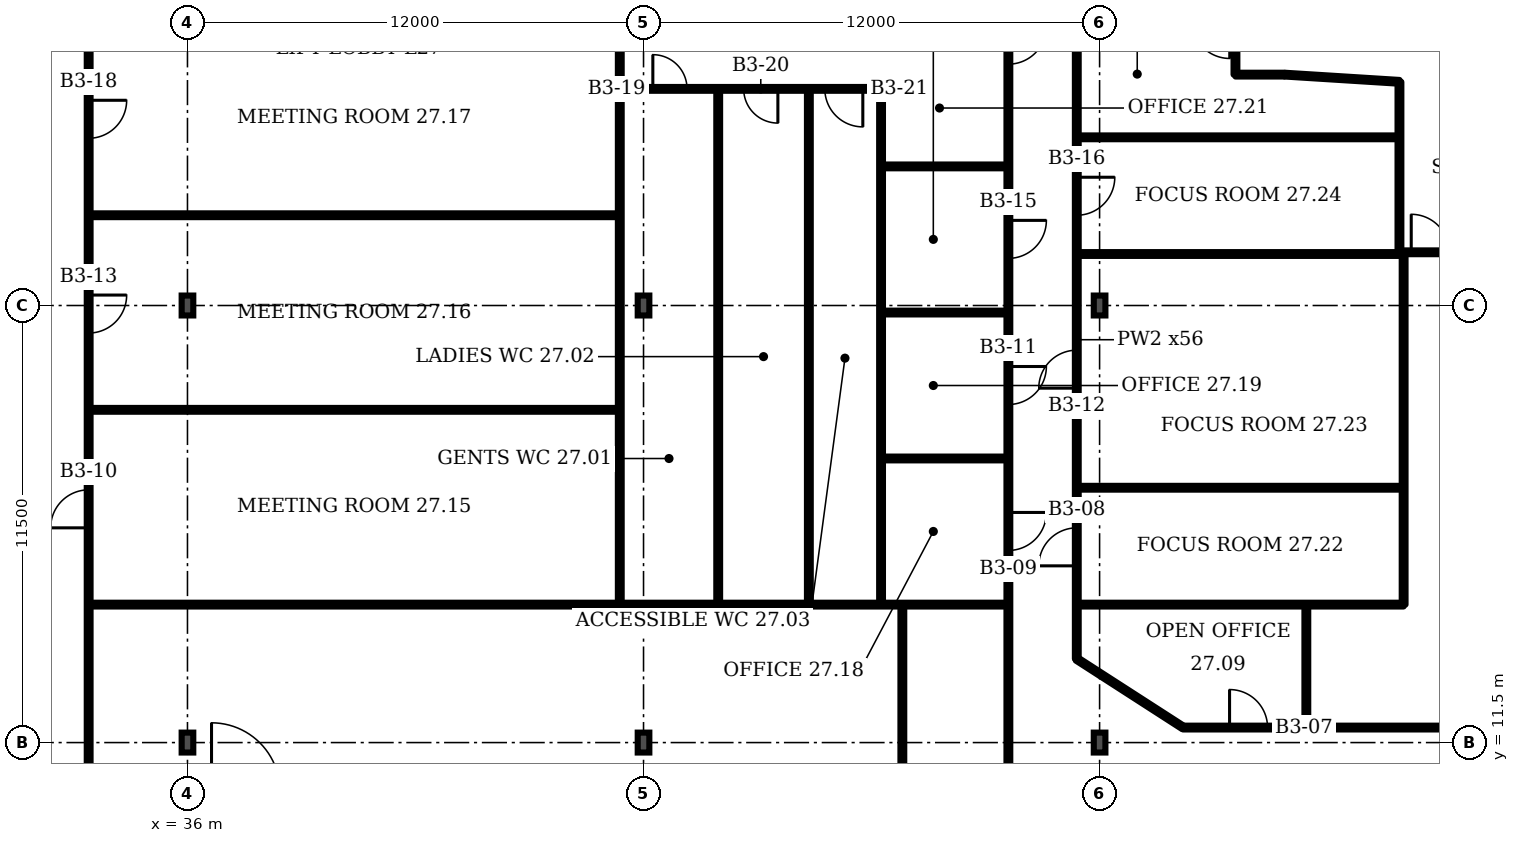
"""IFC4 building model, lengths in metres.
Left out: names, types, materials, properties, quantities, classifications, styles, units other than length and angle.
Written with IfcOpenShell. Run it as: python <this file> out.ifc"""

import sys

from ifc_helpers import new_model, si_unit, direction, frame, frame_2d, origin, origin_2d, place, context, subcontext, project, spatial, rectangle, i_section, extrude, element, fill, save


model = new_model("IFC4")
c1 = context("Model", 3, precision=1e-05, world=origin(), true_north=direction((0.0, 1.0)))
c2 = subcontext(c1, "Body", "Model", "MODEL_VIEW")
j1 = project(units=[si_unit("LENGTHUNIT", "METRE"), si_unit("PLANEANGLEUNIT", "RADIAN")], contexts=[c1])
p1 = place(None, origin())
s1 = spatial("IfcSite", under=j1, at=p1, CompositionType="ELEMENT")
p2 = place(p1, origin())
s2 = spatial("IfcBuilding", under=s1, at=p2, CompositionType="ELEMENT")
p3 = place(p2, frame((0.0, 0.0, 118.3)))
s3 = spatial("IfcBuildingStorey", under=s2, at=p3, CompositionType="ELEMENT", Elevation=118.3)
for number, where, z_axis, x_axis in (
    (1, (36.0, 11.5, 0.0), (0.0, 0.0, 1.0), (1.0, 0.0, 0.0)),
    (2, (48.0, 11.5, 0.0), (0.0, 0.0, 1.0), (1.0, 0.0, 0.0)),
    (3, (60.0, 11.5, 0.0), (0.0, 0.0, 1.0), (1.0, 0.0, 0.0)),
    (4, (36.0, 23.0, 0.0), (0.0, 0.0, 1.0), (1.0, 0.0, 0.0)),
    (5, (48.0, 23.0, 0.0), (0.0, 0.0, 1.0), (1.0, 0.0, 0.0)),
    (6, (60.0, 23.0, 0.0), (0.0, 0.0, 1.0), (1.0, 0.0, 0.0)),
):
    element("IfcColumn", number, at=place(p3, frame(where, z_axis=z_axis, x_axis=x_axis)), inside=s3, PredefinedType="COLUMN", context=c2, shape_type="SweptSolid", body=[
        extrude(i_section(OverallWidth=0.306, OverallDepth=0.524, WebThickness=0.021, FlangeThickness=0.04, FilletRadius=0.027, at=origin_2d()), origin(), (0.0, 0.0, 1.0), 3.6),
    ])
p4 = place(p3, frame((33.4, 10.22, 0.0), z_axis=(0.0, 0.0, 1.0), x_axis=(0.0, 1.0, 0.0)))
e7 = element("IfcWall", 7, at=p4, inside=s3, PredefinedType="PARTITIONING", context=c2, shape_type="SweptSolid", body=[
    extrude(rectangle(XDim=20.28, YDim=0.1, at=frame_2d((10.14, 0.0))), origin(), (0.0, 0.0, 1.0), 3.2),
])
p5 = place(p4, frame((6.93, 0.0, 0.0)))
e8 = element("IfcOpeningElement", 8, at=p5, cuts=e7, PredefinedType="OPENING", context=c2, shape_type="SweptSolid", body=[
    extrude(rectangle(XDim=1.0, YDim=2.1, at=frame_2d((0.5, 1.05))), frame((0.0, 0.06, 0.0), z_axis=(0.0, -1.0, 0.0), x_axis=(1.0, 0.0, 0.0)), (0.0, 0.0, 1.0), 0.12),
])
p6 = place(p4, frame((12.055, 0.0, 0.0)))
e9 = element("IfcOpeningElement", 9, at=p6, cuts=e7, PredefinedType="OPENING", context=c2, shape_type="SweptSolid", body=[
    extrude(rectangle(XDim=1.0, YDim=2.1, at=frame_2d((0.5, 1.05))), frame((0.0, 0.06, 0.0), z_axis=(0.0, -1.0, 0.0), x_axis=(1.0, 0.0, 0.0)), (0.0, 0.0, 1.0), 0.12),
])
p7 = place(p4, frame((17.18, 0.0, 0.0)))
e10 = element("IfcOpeningElement", 10, at=p7, cuts=e7, PredefinedType="OPENING", context=c2, shape_type="SweptSolid", body=[
    extrude(rectangle(XDim=1.0, YDim=2.1, at=frame_2d((0.5, 1.05))), frame((0.0, 0.06, 0.0), z_axis=(0.0, -1.0, 0.0), x_axis=(1.0, 0.0, 0.0)), (0.0, 0.0, 1.0), 0.12),
])
p8 = place(p3, frame((33.4, 15.13, 0.0), z_axis=(0.0, 0.0, 1.0), x_axis=(1.0, 0.0, 0.0)))
e11 = element("IfcWall", 11, at=p8, inside=s3, PredefinedType="PARTITIONING", context=c2, shape_type="SweptSolid", body=[
    extrude(rectangle(XDim=24.2, YDim=0.1, at=frame_2d((12.1, 0.0))), origin(), (0.0, 0.0, 1.0), 3.2),
])
for number, where, z_axis, x_axis in (
    (12, (33.4, 20.255, 0.0), (0.0, 0.0, 1.0), (1.0, 0.0, 0.0)),
    (13, (33.4, 25.375, 0.0), (0.0, 0.0, 1.0), (1.0, 0.0, 0.0)),
):
    element("IfcWall", number, at=place(p3, frame(where, z_axis=z_axis, x_axis=x_axis)), inside=s3, PredefinedType="PARTITIONING", context=c2, shape_type="SweptSolid", body=[
        extrude(rectangle(XDim=13.975, YDim=0.1, at=frame_2d((6.988, 0.0))), origin(), (0.0, 0.0, 1.0), 3.2),
    ])
p9 = place(p3, frame((47.375, 15.13, 0.0), z_axis=(0.0, 0.0, 1.0), x_axis=(0.0, 1.0, 0.0)))
e14 = element("IfcWall", 14, at=p9, inside=s3, PredefinedType="PARTITIONING", context=c2, shape_type="SweptSolid", body=[
    extrude(rectangle(XDim=15.36, YDim=0.1, at=frame_2d((7.68, 0.0))), origin(), (0.0, 0.0, 1.0), 3.2),
])
p10 = place(p3, frame((47.375, 28.7, 0.0), z_axis=(0.0, 0.0, 1.0), x_axis=(1.0, 0.0, 0.0)))
e15 = element("IfcWall", 15, at=p10, inside=s3, PredefinedType="PARTITIONING", context=c2, shape_type="SweptSolid", body=[
    extrude(rectangle(XDim=6.875, YDim=0.1, at=frame_2d((3.438, 0.0))), origin(), (0.0, 0.0, 1.0), 3.2),
])
p11 = place(p10, frame((0.87, 0.0, 0.0)))
e16 = element("IfcOpeningElement", 16, at=p11, cuts=e15, PredefinedType="OPENING", context=c2, shape_type="SweptSolid", body=[
    extrude(rectangle(XDim=0.9, YDim=2.1, at=frame_2d((0.45, 1.05))), frame((0.0, 0.06, 0.0), z_axis=(0.0, -1.0, 0.0), x_axis=(1.0, 0.0, 0.0)), (0.0, 0.0, 1.0), 0.12),
])
p12 = place(p10, frame((3.26, 0.0, 0.0)))
e17 = element("IfcOpeningElement", 17, at=p12, cuts=e15, PredefinedType="OPENING", context=c2, shape_type="SweptSolid", body=[
    extrude(rectangle(XDim=0.9, YDim=2.1, at=frame_2d((0.45, 1.05))), frame((0.0, 0.06, 0.0), z_axis=(0.0, -1.0, 0.0), x_axis=(1.0, 0.0, 0.0)), (0.0, 0.0, 1.0), 0.12),
])
p13 = place(p10, frame((5.395, 0.0, 0.0)))
e18 = element("IfcOpeningElement", 18, at=p13, cuts=e15, PredefinedType="OPENING", context=c2, shape_type="SweptSolid", body=[
    extrude(rectangle(XDim=1.0, YDim=2.1, at=frame_2d((0.5, 1.05))), frame((0.0, 0.06, 0.0), z_axis=(0.0, -1.0, 0.0), x_axis=(1.0, 0.0, 0.0)), (0.0, 0.0, 1.0), 0.12),
])
for number, where, z_axis, x_axis in (
    (19, (49.965, 15.13, 0.0), (0.0, 0.0, 1.0), (0.0, 1.0, 0.0)),
    (20, (52.35, 15.13, 0.0), (0.0, 0.0, 1.0), (0.0, 1.0, 0.0)),
    (21, (54.25, 15.13, 0.0), (0.0, 0.0, 1.0), (0.0, 1.0, 0.0)),
):
    element("IfcWall", number, at=place(p3, frame(where, z_axis=z_axis, x_axis=x_axis)), inside=s3, PredefinedType="PARTITIONING", context=c2, shape_type="SweptSolid", body=[
        extrude(rectangle(XDim=13.57, YDim=0.1, at=frame_2d((6.785, 0.0))), origin(), (0.0, 0.0, 1.0), 3.2),
    ])
for number, where, z_axis, x_axis in (
    (22, (54.25, 18.975, 0.0), (0.0, 0.0, 1.0), (1.0, 0.0, 0.0)),
    (23, (54.25, 22.815, 0.0), (0.0, 0.0, 1.0), (1.0, 0.0, 0.0)),
    (24, (54.25, 26.66, 0.0), (0.0, 0.0, 1.0), (1.0, 0.0, 0.0)),
):
    element("IfcWall", number, at=place(p3, frame(where, z_axis=z_axis, x_axis=x_axis)), inside=s3, PredefinedType="PARTITIONING", context=c2, shape_type="SweptSolid", body=[
        extrude(rectangle(XDim=3.35, YDim=0.1, at=frame_2d((1.675, 0.0))), origin(), (0.0, 0.0, 1.0), 3.2),
    ])
p14 = place(p3, frame((54.81, -1.034, 0.0), z_axis=(0.0, 0.0, 1.0), x_axis=(0.0, 1.0, 0.0)))
e25 = element("IfcWall", 25, at=p14, inside=s3, PredefinedType="PARTITIONING", context=c2, shape_type="SweptSolid", body=[
    extrude(rectangle(XDim=16.164, YDim=0.1, at=frame_2d((8.082, 0.0))), origin(), (0.0, 0.0, 1.0), 2.58),
])
p15 = place(p3, frame((57.6, -0.79, 0.0), z_axis=(0.0, 0.0, 1.0), x_axis=(0.0, 1.0, 0.0)))
e26 = element("IfcWall", 26, at=p15, inside=s3, PredefinedType="PARTITIONING", context=c2, shape_type="SweptSolid", body=[
    extrude(rectangle(XDim=31.29, YDim=0.1, at=frame_2d((15.645, 0.0))), origin(), (0.0, 0.0, 1.0), 2.58),
])
p16 = place(p15, frame((7.5, 0.0, 0.0)))
e27 = element("IfcOpeningElement", 27, at=p16, cuts=e26, PredefinedType="OPENING", context=c2, shape_type="SweptSolid", body=[
    extrude(rectangle(XDim=1.0, YDim=2.1, at=frame_2d((0.5, 1.05))), frame((0.0, 0.06, 0.0), z_axis=(0.0, -1.0, 0.0), x_axis=(1.0, 0.0, 0.0)), (0.0, 0.0, 1.0), 0.12),
])
p17 = place(p15, frame((17.344, 0.0, 0.0)))
e28 = element("IfcOpeningElement", 28, at=p17, cuts=e26, PredefinedType="OPENING", context=c2, shape_type="SweptSolid", body=[
    extrude(rectangle(XDim=1.0, YDim=2.1, at=frame_2d((0.5, 1.05))), frame((0.0, 0.06, 0.0), z_axis=(0.0, -1.0, 0.0), x_axis=(1.0, 0.0, 0.0)), (0.0, 0.0, 1.0), 0.12),
])
p18 = place(p15, frame((21.185, 0.0, 0.0)))
e29 = element("IfcOpeningElement", 29, at=p18, cuts=e26, PredefinedType="OPENING", context=c2, shape_type="SweptSolid", body=[
    extrude(rectangle(XDim=1.0, YDim=2.1, at=frame_2d((0.5, 1.05))), frame((0.0, 0.06, 0.0), z_axis=(0.0, -1.0, 0.0), x_axis=(1.0, 0.0, 0.0)), (0.0, 0.0, 1.0), 0.12),
])
p19 = place(p15, frame((25.03, 0.0, 0.0)))
e30 = element("IfcOpeningElement", 30, at=p19, cuts=e26, PredefinedType="OPENING", context=c2, shape_type="SweptSolid", body=[
    extrude(rectangle(XDim=1.0, YDim=2.1, at=frame_2d((0.5, 1.05))), frame((0.0, 0.06, 0.0), z_axis=(0.0, -1.0, 0.0), x_axis=(1.0, 0.0, 0.0)), (0.0, 0.0, 1.0), 0.12),
])
p20 = place(p15, frame((30.139, 0.0, 0.0)))
e31 = element("IfcOpeningElement", 31, at=p20, cuts=e26, PredefinedType="OPENING", context=c2, shape_type="SweptSolid", body=[
    extrude(rectangle(XDim=1.0, YDim=2.1, at=frame_2d((0.5, 1.05))), frame((0.0, 0.06, 0.0), z_axis=(0.0, -1.0, 0.0), x_axis=(1.0, 0.0, 0.0)), (0.0, 0.0, 1.0), 0.12),
])
p21 = place(p3, frame((59.4, 13.7, 0.0), z_axis=(0.0, 0.0, 1.0), x_axis=(0.0, 1.0, 0.0)))
e32 = element("IfcWall", 32, at=p21, inside=s3, PredefinedType="PARTITIONING", context=c2, shape_type="SweptSolid", body=[
    extrude(rectangle(XDim=16.8, YDim=0.1, at=frame_2d((8.4, 0.0))), origin(), (0.0, 0.0, 1.0), 3.2),
])
p22 = place(p21, frame((2.45, 0.0, 0.0)))
e33 = element("IfcOpeningElement", 33, at=p22, cuts=e32, PredefinedType="OPENING", context=c2, shape_type="SweptSolid", body=[
    extrude(rectangle(XDim=1.0, YDim=2.1, at=frame_2d((0.5, 1.05))), frame((0.0, 0.06, 0.0), z_axis=(0.0, -1.0, 0.0), x_axis=(1.0, 0.0, 0.0)), (0.0, 0.0, 1.0), 0.12),
])
p23 = place(p21, frame((7.125, 0.0, 0.0)))
e34 = element("IfcOpeningElement", 34, at=p23, cuts=e32, PredefinedType="OPENING", context=c2, shape_type="SweptSolid", body=[
    extrude(rectangle(XDim=1.0, YDim=2.1, at=frame_2d((0.5, 1.05))), frame((0.0, 0.06, 0.0), z_axis=(0.0, -1.0, 0.0), x_axis=(1.0, 0.0, 0.0)), (0.0, 0.0, 1.0), 0.12),
])
p24 = place(p21, frame((11.675, 0.0, 0.0)))
e35 = element("IfcOpeningElement", 35, at=p24, cuts=e32, PredefinedType="OPENING", context=c2, shape_type="SweptSolid", body=[
    extrude(rectangle(XDim=1.0, YDim=2.1, at=frame_2d((0.5, 1.05))), frame((0.0, 0.06, 0.0), z_axis=(0.0, -1.0, 0.0), x_axis=(1.0, 0.0, 0.0)), (0.0, 0.0, 1.0), 0.12),
])
for number, where, z_axis, x_axis in (
    (36, (59.4, 15.13, 0.0), (0.0, 0.0, 1.0), (1.0, 0.0, 0.0)),
    (37, (59.4, 18.205, 0.0), (0.0, 0.0, 1.0), (1.0, 0.0, 0.0)),
    (38, (59.4, 24.355, 0.0), (0.0, 0.0, 1.0), (1.0, 0.0, 0.0)),
):
    element("IfcWall", number, at=place(p3, frame(where, z_axis=z_axis, x_axis=x_axis)), inside=s3, PredefinedType="PARTITIONING", context=c2, shape_type="SweptSolid", body=[
        extrude(rectangle(XDim=8.6, YDim=0.1, at=frame_2d((4.3, 0.0))), origin(), (0.0, 0.0, 1.0), 3.2),
    ])
p25 = place(p3, frame((59.4, 27.425, 0.0), z_axis=(0.0, 0.0, 1.0), x_axis=(1.0, 0.0, 0.0)))
e39 = element("IfcWall", 39, at=p25, inside=s3, PredefinedType="PARTITIONING", context=c2, shape_type="SweptSolid", body=[
    extrude(rectangle(XDim=8.49, YDim=0.1, at=frame_2d((4.245, 0.0))), origin(), (0.0, 0.0, 1.0), 3.2),
])
p26 = place(p3, frame((62.2, 11.895, 0.0), z_axis=(0.0, 0.0, 1.0), x_axis=(1.0, 0.0, 0.0)))
e40 = element("IfcWall", 40, at=p26, inside=s3, PredefinedType="PARTITIONING", context=c2, shape_type="SweptSolid", body=[
    extrude(rectangle(XDim=7.6, YDim=0.1, at=frame_2d((3.8, 0.0))), origin(), (0.0, 0.0, 1.0), 3.2),
])
p27 = place(p26, frame((1.22, 0.0, 0.0)))
e41 = element("IfcOpeningElement", 41, at=p27, cuts=e40, PredefinedType="OPENING", context=c2, shape_type="SweptSolid", body=[
    extrude(rectangle(XDim=1.0, YDim=2.1, at=frame_2d((0.5, 1.05))), frame((0.0, 0.06, 0.0), z_axis=(0.0, -1.0, 0.0), x_axis=(1.0, 0.0, 0.0)), (0.0, 0.0, 1.0), 0.12),
])
p28 = place(p3, frame((62.2, 11.895, 0.0), z_axis=(0.0, 0.0, 1.0), x_axis=(-0.840512, 0.5418, 0.0)))
e42 = element("IfcWall", 42, at=p28, inside=s3, PredefinedType="PARTITIONING", context=c2, shape_type="SweptSolid", body=[
    extrude(rectangle(XDim=3.331, YDim=0.1, at=frame_2d((1.666, 0.0))), origin(), (0.0, 0.0, 1.0), 3.2),
])
p29 = place(p3, frame((63.575, 29.075, 0.0), z_axis=(0.0, 0.0, 1.0), x_axis=(0.0, 1.0, 0.0)))
e43 = element("IfcWall", 43, at=p29, inside=s3, PredefinedType="PARTITIONING", context=c2, shape_type="SweptSolid", body=[
    extrude(rectangle(XDim=1.425, YDim=0.1, at=frame_2d((0.712, 0.0))), origin(), (0.0, 0.0, 1.0), 3.2),
])
p30 = place(p3, frame((63.575, 29.075, 0.0), z_axis=(0.0, 0.0, 1.0), x_axis=(1.0, 0.0, 0.0)))
e44 = element("IfcWall", 44, at=p30, inside=s3, PredefinedType="PARTITIONING", context=c2, shape_type="SweptSolid", body=[
    extrude(rectangle(XDim=1.285, YDim=0.1, at=frame_2d((0.643, 0.0))), origin(), (0.0, 0.0, 1.0), 3.2),
])
p31 = place(p3, frame((65.44, 11.895, 0.0), z_axis=(0.0, 0.0, 1.0), x_axis=(0.0, 1.0, 0.0)))
e45 = element("IfcWall", 45, at=p31, inside=s3, PredefinedType="PARTITIONING", context=c2, shape_type="SweptSolid", body=[
    extrude(rectangle(XDim=3.235, YDim=0.1, at=frame_2d((1.617, 0.0))), origin(), (0.0, 0.0, 1.0), 3.2),
])
p32 = place(p3, frame((67.89, 24.4, 0.0), z_axis=(0.0, 0.0, 1.0), x_axis=(0.0, 1.0, 0.0)))
e46 = element("IfcWall", 46, at=p32, inside=s3, PredefinedType="PARTITIONING", context=c2, shape_type="SweptSolid", body=[
    extrude(rectangle(XDim=4.485, YDim=0.1, at=frame_2d((2.243, 0.0))), origin(), (0.0, 0.0, 1.0), 3.2),
])
p33 = place(p3, frame((68.0, 24.4, 0.0), z_axis=(0.0, 0.0, 1.0), x_axis=(1.0, 0.0, 0.0)))
e47 = element("IfcWall", 47, at=p33, inside=s3, PredefinedType="PARTITIONING", context=c2, shape_type="SweptSolid", body=[
    extrude(rectangle(XDim=1.67, YDim=0.1, at=frame_2d((0.835, 0.0))), origin(), (0.0, 0.0, 1.0), 3.2),
])
p34 = place(p33, frame((0.2, 0.0, 0.0)))
e48 = element("IfcOpeningElement", 48, at=p34, cuts=e47, PredefinedType="OPENING", context=c2, shape_type="SweptSolid", body=[
    extrude(rectangle(XDim=1.0, YDim=2.1, at=frame_2d((0.5, 1.05))), frame((0.0, 0.06, 0.0), z_axis=(0.0, -1.0, 0.0), x_axis=(1.0, 0.0, 0.0)), (0.0, 0.0, 1.0), 0.12),
])
p35 = place(p3, frame((67.89, 28.885, 0.0), z_axis=(0.0, 0.0, 1.0), x_axis=(-0.998031, 0.062786, 0.0)))
e49 = element("IfcWall", 49, at=p35, inside=s3, PredefinedType="PARTITIONING", context=c2, shape_type="SweptSolid", body=[
    extrude(rectangle(XDim=3.021, YDim=0.1, at=frame_2d((1.511, 0.0))), origin(), (0.0, 0.0, 1.0), 3.2),
])
p36 = place(p3, frame((68.0, 15.13, 0.0), z_axis=(0.0, 0.0, 1.0), x_axis=(0.0, 1.0, 0.0)))
e50 = element("IfcWall", 50, at=p36, inside=s3, PredefinedType="PARTITIONING", context=c2, shape_type="SweptSolid", body=[
    extrude(rectangle(XDim=9.22, YDim=0.1, at=frame_2d((4.61, 0.0))), origin(), (0.0, 0.0, 1.0), 3.2),
])
p37 = place(p27, origin())
e51 = element("IfcDoor", 51, at=p37, inside=s3, OperationType="SINGLE_SWING_LEFT", PredefinedType="DOOR", context=c2, shape_type="SweptSolid", body=[
    extrude(rectangle(XDim=1.0, YDim=2.1, at=frame_2d((0.5, 1.05))), frame((0.0, 0.025, 0.0), z_axis=(0.0, -1.0, 0.0), x_axis=(1.0, 0.0, 0.0)), (0.0, 0.0, 1.0), 0.05),
])
fill(e41, e51)
p38 = place(p22, origin())
e52 = element("IfcDoor", 52, at=p38, inside=s3, OperationType="SINGLE_SWING_LEFT", PredefinedType="DOOR", context=c2, shape_type="SweptSolid", body=[
    extrude(rectangle(XDim=1.0, YDim=2.1, at=frame_2d((0.5, 1.05))), frame((0.0, 0.025, 0.0), z_axis=(0.0, -1.0, 0.0), x_axis=(1.0, 0.0, 0.0)), (0.0, 0.0, 1.0), 0.05),
])
fill(e33, e52)
p39 = place(p17, origin())
e53 = element("IfcDoor", 53, at=p39, inside=s3, OperationType="SINGLE_SWING_RIGHT", PredefinedType="DOOR", context=c2, shape_type="SweptSolid", body=[
    extrude(rectangle(XDim=1.0, YDim=2.1, at=frame_2d((0.5, 1.05))), frame((0.0, 0.025, 0.0), z_axis=(0.0, -1.0, 0.0), x_axis=(1.0, 0.0, 0.0)), (0.0, 0.0, 1.0), 0.05),
])
fill(e28, e53)
p40 = place(p5, origin())
e54 = element("IfcDoor", 54, at=p40, inside=s3, OperationType="SINGLE_SWING_LEFT", PredefinedType="DOOR", context=c2, shape_type="SweptSolid", body=[
    extrude(rectangle(XDim=1.0, YDim=2.1, at=frame_2d((0.5, 1.05))), frame((0.0, 0.025, 0.0), z_axis=(0.0, -1.0, 0.0), x_axis=(1.0, 0.0, 0.0)), (0.0, 0.0, 1.0), 0.05),
])
fill(e8, e54)
p41 = place(p18, origin())
e55 = element("IfcDoor", 55, at=p41, inside=s3, OperationType="SINGLE_SWING_RIGHT", PredefinedType="DOOR", context=c2, shape_type="SweptSolid", body=[
    extrude(rectangle(XDim=1.0, YDim=2.1, at=frame_2d((0.5, 1.05))), frame((0.0, 0.025, 0.0), z_axis=(0.0, -1.0, 0.0), x_axis=(1.0, 0.0, 0.0)), (0.0, 0.0, 1.0), 0.05),
])
fill(e29, e55)
p42 = place(p23, origin())
e56 = element("IfcDoor", 56, at=p42, inside=s3, OperationType="SINGLE_SWING_LEFT", PredefinedType="DOOR", context=c2, shape_type="SweptSolid", body=[
    extrude(rectangle(XDim=1.0, YDim=2.1, at=frame_2d((0.5, 1.05))), frame((0.0, 0.025, 0.0), z_axis=(0.0, -1.0, 0.0), x_axis=(1.0, 0.0, 0.0)), (0.0, 0.0, 1.0), 0.05),
])
fill(e34, e56)
p43 = place(p6, origin())
e57 = element("IfcDoor", 57, at=p43, inside=s3, OperationType="SINGLE_SWING_RIGHT", PredefinedType="DOOR", context=c2, shape_type="SweptSolid", body=[
    extrude(rectangle(XDim=1.0, YDim=2.1, at=frame_2d((0.5, 1.05))), frame((0.0, 0.025, 0.0), z_axis=(0.0, -1.0, 0.0), x_axis=(1.0, 0.0, 0.0)), (0.0, 0.0, 1.0), 0.05),
])
fill(e9, e57)
p44 = place(p34, origin())
e58 = element("IfcDoor", 58, at=p44, inside=s3, OperationType="SINGLE_SWING_LEFT", PredefinedType="DOOR", context=c2, shape_type="SweptSolid", body=[
    extrude(rectangle(XDim=1.0, YDim=2.1, at=frame_2d((0.5, 1.05))), frame((0.0, 0.025, 0.0), z_axis=(0.0, -1.0, 0.0), x_axis=(1.0, 0.0, 0.0)), (0.0, 0.0, 1.0), 0.05),
])
fill(e48, e58)
p45 = place(p19, origin())
e59 = element("IfcDoor", 59, at=p45, inside=s3, OperationType="SINGLE_SWING_RIGHT", PredefinedType="DOOR", context=c2, shape_type="SweptSolid", body=[
    extrude(rectangle(XDim=1.0, YDim=2.1, at=frame_2d((0.5, 1.05))), frame((0.0, 0.025, 0.0), z_axis=(0.0, -1.0, 0.0), x_axis=(1.0, 0.0, 0.0)), (0.0, 0.0, 1.0), 0.05),
])
fill(e30, e59)
p46 = place(p24, origin())
e60 = element("IfcDoor", 60, at=p46, inside=s3, OperationType="SINGLE_SWING_RIGHT", PredefinedType="DOOR", context=c2, shape_type="SweptSolid", body=[
    extrude(rectangle(XDim=1.0, YDim=2.1, at=frame_2d((0.5, 1.05))), frame((0.0, 0.025, 0.0), z_axis=(0.0, -1.0, 0.0), x_axis=(1.0, 0.0, 0.0)), (0.0, 0.0, 1.0), 0.05),
])
fill(e35, e60)
p47 = place(p7, origin())
e61 = element("IfcDoor", 61, at=p47, inside=s3, OperationType="SINGLE_SWING_RIGHT", PredefinedType="DOOR", context=c2, shape_type="SweptSolid", body=[
    extrude(rectangle(XDim=1.0, YDim=2.1, at=frame_2d((0.5, 1.05))), frame((0.0, 0.025, 0.0), z_axis=(0.0, -1.0, 0.0), x_axis=(1.0, 0.0, 0.0)), (0.0, 0.0, 1.0), 0.05),
])
fill(e10, e61)
p48 = place(p11, origin())
e62 = element("IfcDoor", 62, at=p48, inside=s3, OperationType="SINGLE_SWING_LEFT", PredefinedType="DOOR", context=c2, shape_type="SweptSolid", body=[
    extrude(rectangle(XDim=0.9, YDim=2.1, at=frame_2d((0.45, 1.05))), frame((0.0, 0.025, 0.0), z_axis=(0.0, -1.0, 0.0), x_axis=(1.0, 0.0, 0.0)), (0.0, 0.0, 1.0), 0.05),
])
fill(e16, e62)
p49 = place(p12, origin())
e63 = element("IfcDoor", 63, at=p49, inside=s3, OperationType="SINGLE_SWING_RIGHT", PredefinedType="DOOR", context=c2, shape_type="SweptSolid", body=[
    extrude(rectangle(XDim=0.9, YDim=2.1, at=frame_2d((0.45, 1.05))), frame((0.0, 0.025, 0.0), z_axis=(0.0, -1.0, 0.0), x_axis=(1.0, 0.0, 0.0)), (0.0, 0.0, 1.0), 0.05),
])
fill(e17, e63)
p50 = place(p13, origin())
e64 = element("IfcDoor", 64, at=p50, inside=s3, OperationType="SINGLE_SWING_RIGHT", PredefinedType="DOOR", context=c2, shape_type="SweptSolid", body=[
    extrude(rectangle(XDim=1.0, YDim=2.1, at=frame_2d((0.5, 1.05))), frame((0.0, 0.025, 0.0), z_axis=(0.0, -1.0, 0.0), x_axis=(1.0, 0.0, 0.0)), (0.0, 0.0, 1.0), 0.05),
])
fill(e18, e64)
p51 = place(p20, origin())
e65 = element("IfcDoor", 65, at=p51, inside=s3, OperationType="SINGLE_SWING_RIGHT", PredefinedType="DOOR", context=c2, shape_type="SweptSolid", body=[
    extrude(rectangle(XDim=1.0, YDim=2.1, at=frame_2d((0.5, 1.05))), frame((0.0, 0.025, 0.0), z_axis=(0.0, -1.0, 0.0), x_axis=(1.0, 0.0, 0.0)), (0.0, 0.0, 1.0), 0.05),
])
fill(e31, e65)
save(model, sys.argv[1])
